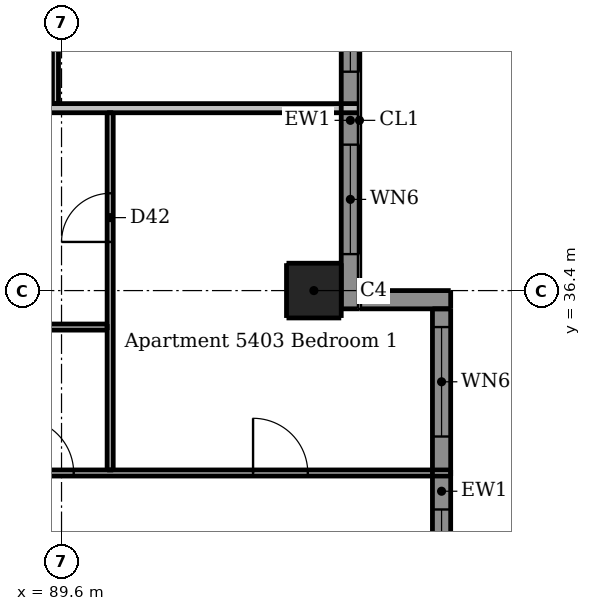
"""IFC4 building model, lengths in metres.
Left out: names, types, materials, properties, quantities, classifications, styles, units other than length and angle.
Written with IfcOpenShell. Run it as: python <this file> out.ifc"""

import sys

from ifc_helpers import new_model, si_unit, direction, frame, frame_2d, origin, origin_2d, place, context, subcontext, project, spatial, rectangle, extrude, element, fill, save


model = new_model("IFC4")
c1 = context("Model", 3, precision=1e-05, world=origin(), true_north=direction((0.0, 1.0)))
c2 = subcontext(c1, "Body", "Model", "MODEL_VIEW")
j1 = project(units=[si_unit("LENGTHUNIT", "METRE"), si_unit("PLANEANGLEUNIT", "RADIAN")], contexts=[c1])
p1 = place(None, origin())
s1 = spatial("IfcSite", under=j1, at=p1, CompositionType="ELEMENT")
p2 = place(p1, origin())
s2 = spatial("IfcBuilding", under=s1, at=p2, CompositionType="ELEMENT")
p3 = place(p2, frame((0.0, 0.0, 203.5)))
s3 = spatial("IfcBuildingStorey", under=s2, at=p3, CompositionType="ELEMENT", Elevation=203.5)
p4 = place(p3, frame((93.75, 36.4, 0.0), z_axis=(0.0, 0.0, 1.0), x_axis=(1.0, 0.0, 0.0)))
e1 = element("IfcColumn", 1, at=p4, inside=s3, PredefinedType="COLUMN", context=c2, shape_type="SweptSolid", body=[
    extrude(rectangle(XDim=0.9, YDim=0.9, at=origin_2d()), origin(), (0.0, 0.0, 1.0), 3.05),
])
p5 = place(p3, frame((96.0, 36.25, 0.0), z_axis=(0.0, 0.0, 1.0), x_axis=(-1.0, 0.0, 0.0)))
e2 = element("IfcWall", 2, at=p5, inside=s3, PredefinedType="SOLIDWALL", context=c2, shape_type="SweptSolid", body=[
    extrude(rectangle(XDim=1.5, YDim=0.3, at=frame_2d((0.75, 0.0))), origin(), (0.0, 0.0, 1.0), 3.05),
])
p6 = place(p3, frame((95.85, 30.1, 0.0), z_axis=(0.0, 0.0, 1.0), x_axis=(0.0, 1.0, 0.0)))
e3 = element("IfcWall", 3, at=p6, inside=s3, PredefinedType="SOLIDWALL", context=c2, shape_type="SweptSolid", body=[
    extrude(rectangle(XDim=6.0, YDim=0.3, at=frame_2d((3.0, 0.0))), origin(), (0.0, 0.0, 1.0), 3.05),
])
p7 = place(p6, frame((0.9, 0.0, 0.15)))
e4 = element("IfcOpeningElement", 4, at=p7, cuts=e3, PredefinedType="OPENING", context=c2, shape_type="SweptSolid", body=[
    extrude(rectangle(XDim=1.8, YDim=2.1, at=frame_2d((0.9, 1.05))), frame((0.0, 0.16, 0.0), z_axis=(0.0, -1.0, 0.0), x_axis=(1.0, 0.0, 0.0)), (0.0, 0.0, 1.0), 0.32),
])
p8 = place(p6, frame((3.9, 0.0, 0.15)))
e5 = element("IfcOpeningElement", 5, at=p8, cuts=e3, PredefinedType="OPENING", context=c2, shape_type="SweptSolid", body=[
    extrude(rectangle(XDim=1.8, YDim=2.1, at=frame_2d((0.9, 1.05))), frame((0.0, 0.16, 0.0), z_axis=(0.0, -1.0, 0.0), x_axis=(1.0, 0.0, 0.0)), (0.0, 0.0, 1.0), 0.32),
])
p9 = place(p3, frame((94.35, 36.1, 0.0), z_axis=(0.0, 0.0, 1.0), x_axis=(0.0, 1.0, 0.0)))
e6 = element("IfcWall", 6, at=p9, inside=s3, PredefinedType="SOLIDWALL", context=c2, shape_type="SweptSolid", body=[
    extrude(rectangle(XDim=6.2, YDim=0.3, at=frame_2d((3.1, 0.0))), origin(), (0.0, 0.0, 1.0), 3.05),
])
p10 = place(p9, frame((0.9, 0.0, 0.15)))
e7 = element("IfcOpeningElement", 7, at=p10, cuts=e6, PredefinedType="OPENING", context=c2, shape_type="SweptSolid", body=[
    extrude(rectangle(XDim=1.8, YDim=2.1, at=frame_2d((0.9, 1.05))), frame((0.0, 0.16, 0.0), z_axis=(0.0, -1.0, 0.0), x_axis=(1.0, 0.0, 0.0)), (0.0, 0.0, 1.0), 0.32),
])
p11 = place(p9, frame((3.9, 0.0, 0.15)))
e8 = element("IfcOpeningElement", 8, at=p11, cuts=e6, PredefinedType="OPENING", context=c2, shape_type="SweptSolid", body=[
    extrude(rectangle(XDim=1.8, YDim=2.1, at=frame_2d((0.9, 1.05))), frame((0.0, 0.16, 0.0), z_axis=(0.0, -1.0, 0.0), x_axis=(1.0, 0.0, 0.0)), (0.0, 0.0, 1.0), 0.32),
])
p12 = place(p3, frame((89.5, 60.325, 0.0), z_axis=(0.0, 0.0, 1.0), x_axis=(0.0, -1.0, 0.0)))
e9 = element("IfcWall", 9, at=p12, inside=s3, PredefinedType="PARTITIONING", context=c2, shape_type="SweptSolid", body=[
    extrude(rectangle(XDim=20.85, YDim=0.1, at=frame_2d((10.425, 0.0))), origin(), (0.0, 0.0, 1.0), 2.51),
])
p13 = place(p12, frame((10.575, 0.0, 0.0)))
e10 = element("IfcOpeningElement", 10, at=p13, cuts=e9, PredefinedType="OPENING", context=c2, shape_type="SweptSolid", body=[
    extrude(rectangle(XDim=0.9, YDim=2.1, at=frame_2d((0.45, 1.05))), frame((0.0, 0.06, 0.0), z_axis=(0.0, -1.0, 0.0), x_axis=(1.0, 0.0, 0.0)), (0.0, 0.0, 1.0), 0.12),
])
p14 = place(p12, frame((6.675, 0.0, 0.0)))
e11 = element("IfcOpeningElement", 11, at=p14, cuts=e9, PredefinedType="OPENING", context=c2, shape_type="SweptSolid", body=[
    extrude(rectangle(XDim=0.9, YDim=2.1, at=frame_2d((0.45, 1.05))), frame((0.0, 0.06, 0.0), z_axis=(0.0, -1.0, 0.0), x_axis=(1.0, 0.0, 0.0)), (0.0, 0.0, 1.0), 0.12),
])
p15 = place(p12, frame((8.775, 0.0, 0.0)))
e12 = element("IfcOpeningElement", 12, at=p15, cuts=e9, PredefinedType="OPENING", context=c2, shape_type="SweptSolid", body=[
    extrude(rectangle(XDim=0.9, YDim=2.1, at=frame_2d((0.45, 1.05))), frame((0.0, 0.06, 0.0), z_axis=(0.0, -1.0, 0.0), x_axis=(1.0, 0.0, 0.0)), (0.0, 0.0, 1.0), 0.12),
])
p16 = place(p12, frame((19.075, 0.0, 0.0)))
e13 = element("IfcOpeningElement", 13, at=p16, cuts=e9, PredefinedType="OPENING", context=c2, shape_type="SweptSolid", body=[
    extrude(rectangle(XDim=0.9, YDim=2.1, at=frame_2d((0.45, 1.05))), frame((0.0, 0.06, 0.0), z_axis=(0.0, -1.0, 0.0), x_axis=(1.0, 0.0, 0.0)), (0.0, 0.0, 1.0), 0.12),
])
p17 = place(p12, frame((15.775, 0.0, 0.0)))
e14 = element("IfcOpeningElement", 14, at=p17, cuts=e9, PredefinedType="OPENING", context=c2, shape_type="SweptSolid", body=[
    extrude(rectangle(XDim=0.9, YDim=2.1, at=frame_2d((0.45, 1.05))), frame((0.0, 0.06, 0.0), z_axis=(0.0, -1.0, 0.0), x_axis=(1.0, 0.0, 0.0)), (0.0, 0.0, 1.0), 0.12),
])
p18 = place(p12, frame((1.275, 0.0, 0.0)))
e15 = element("IfcOpeningElement", 15, at=p18, cuts=e9, PredefinedType="OPENING", context=c2, shape_type="SweptSolid", body=[
    extrude(rectangle(XDim=0.9, YDim=2.1, at=frame_2d((0.45, 1.05))), frame((0.0, 0.06, 0.0), z_axis=(0.0, -1.0, 0.0), x_axis=(1.0, 0.0, 0.0)), (0.0, 0.0, 1.0), 0.12),
])
p19 = place(p12, frame((12.725, 0.0, 0.0)))
e16 = element("IfcOpeningElement", 16, at=p19, cuts=e9, PredefinedType="OPENING", context=c2, shape_type="SweptSolid", body=[
    extrude(rectangle(XDim=0.8, YDim=2.1, at=frame_2d((0.4, 1.05))), frame((0.0, 0.06, 0.0), z_axis=(0.0, -1.0, 0.0), x_axis=(1.0, 0.0, 0.0)), (0.0, 0.0, 1.0), 0.12),
])
p20 = place(p12, frame((4.325, 0.0, 0.0)))
e17 = element("IfcOpeningElement", 17, at=p20, cuts=e9, PredefinedType="OPENING", context=c2, shape_type="SweptSolid", body=[
    extrude(rectangle(XDim=0.8, YDim=2.1, at=frame_2d((0.4, 1.05))), frame((0.0, 0.06, 0.0), z_axis=(0.0, -1.0, 0.0), x_axis=(1.0, 0.0, 0.0)), (0.0, 0.0, 1.0), 0.12),
])
p21 = place(p3, frame((90.4, 33.45, 0.0), z_axis=(0.0, 0.0, 1.0), x_axis=(0.0, 1.0, 0.0)))
e18 = element("IfcWall", 18, at=p21, inside=s3, PredefinedType="PARTITIONING", context=c2, shape_type="SweptSolid", body=[
    extrude(rectangle(XDim=5.875, YDim=0.1, at=frame_2d((2.938, 0.0))), origin(), (0.0, 0.0, 1.0), 3.05),
])
p22 = place(p21, frame((3.75, 0.0, 0.0)))
e19 = element("IfcOpeningElement", 19, at=p22, cuts=e18, PredefinedType="OPENING", context=c2, shape_type="SweptSolid", body=[
    extrude(rectangle(XDim=0.8, YDim=2.1, at=frame_2d((0.4, 1.05))), frame((0.0, 0.06, 0.0), z_axis=(0.0, -1.0, 0.0), x_axis=(1.0, 0.0, 0.0)), (0.0, 0.0, 1.0), 0.12),
])
p23 = place(p3, frame((88.375, 35.8, 0.0), z_axis=(0.0, 0.0, 1.0), x_axis=(1.0, 0.0, 0.0)))
e20 = element("IfcWall", 20, at=p23, inside=s3, PredefinedType="PARTITIONING", context=c2, shape_type="SweptSolid", body=[
    extrude(rectangle(XDim=1.975, YDim=0.1, at=frame_2d((0.988, 0.0))), origin(), (0.0, 0.0, 1.0), 3.05),
])
p24 = place(p3, frame((88.375, 33.4, 0.0), z_axis=(0.0, 0.0, 1.0), x_axis=(1.0, 0.0, 0.0)))
e21 = element("IfcWall", 21, at=p24, inside=s3, PredefinedType="PARTITIONING", context=c2, shape_type="SweptSolid", body=[
    extrude(rectangle(XDim=7.625, YDim=0.1, at=frame_2d((3.812, 0.0))), origin(), (0.0, 0.0, 1.0), 3.05),
])
p25 = place(p24, frame((0.525, 0.0, 0.0)))
e22 = element("IfcOpeningElement", 22, at=p25, cuts=e21, PredefinedType="OPENING", context=c2, shape_type="SweptSolid", body=[
    extrude(rectangle(XDim=0.9, YDim=2.1, at=frame_2d((0.45, 1.05))), frame((0.0, 0.06, 0.0), z_axis=(0.0, -1.0, 0.0), x_axis=(1.0, 0.0, 0.0)), (0.0, 0.0, 1.0), 0.12),
])
p26 = place(p24, frame((4.375, 0.0, 0.0)))
e23 = element("IfcOpeningElement", 23, at=p26, cuts=e21, PredefinedType="OPENING", context=c2, shape_type="SweptSolid", body=[
    extrude(rectangle(XDim=0.9, YDim=2.1, at=frame_2d((0.45, 1.05))), frame((0.0, 0.06, 0.0), z_axis=(0.0, -1.0, 0.0), x_axis=(1.0, 0.0, 0.0)), (0.0, 0.0, 1.0), 0.12),
])
p27 = place(p3, frame((88.375, 39.4, 0.0), z_axis=(0.0, 0.0, 1.0), x_axis=(1.0, 0.0, 0.0)))
e24 = element("IfcWall", 24, at=p27, inside=s3, PredefinedType="PARTITIONING", context=c2, shape_type="SweptSolid", body=[
    extrude(rectangle(XDim=6.125, YDim=0.15, at=frame_2d((3.062, 0.0))), origin(), (0.0, 0.0, 1.0), 3.05),
])
p28 = place(p7, origin())
e25 = element("IfcWindow", 25, at=p28, inside=s3, PartitioningType="DOUBLE_PANEL_VERTICAL", PredefinedType="WINDOW", context=c2, shape_type="SweptSolid", body=[
    extrude(rectangle(XDim=1.8, YDim=2.1, at=frame_2d((0.9, 1.05))), frame((0.0, 0.03, 0.0), z_axis=(0.0, -1.0, 0.0), x_axis=(1.0, 0.0, 0.0)), (0.0, 0.0, 1.0), 0.06),
])
fill(e4, e25)
p29 = place(p8, origin())
e26 = element("IfcWindow", 26, at=p29, inside=s3, PartitioningType="DOUBLE_PANEL_VERTICAL", PredefinedType="WINDOW", context=c2, shape_type="SweptSolid", body=[
    extrude(rectangle(XDim=1.8, YDim=2.1, at=frame_2d((0.9, 1.05))), frame((0.0, 0.03, 0.0), z_axis=(0.0, -1.0, 0.0), x_axis=(1.0, 0.0, 0.0)), (0.0, 0.0, 1.0), 0.06),
])
fill(e5, e26)
p30 = place(p10, origin())
e27 = element("IfcWindow", 27, at=p30, inside=s3, PartitioningType="DOUBLE_PANEL_VERTICAL", PredefinedType="WINDOW", context=c2, shape_type="SweptSolid", body=[
    extrude(rectangle(XDim=1.8, YDim=2.1, at=frame_2d((0.9, 1.05))), frame((0.0, 0.03, 0.0), z_axis=(0.0, -1.0, 0.0), x_axis=(1.0, 0.0, 0.0)), (0.0, 0.0, 1.0), 0.06),
])
fill(e7, e27)
p31 = place(p11, origin())
e28 = element("IfcWindow", 28, at=p31, inside=s3, PartitioningType="DOUBLE_PANEL_VERTICAL", PredefinedType="WINDOW", context=c2, shape_type="SweptSolid", body=[
    extrude(rectangle(XDim=1.8, YDim=2.1, at=frame_2d((0.9, 1.05))), frame((0.0, 0.03, 0.0), z_axis=(0.0, -1.0, 0.0), x_axis=(1.0, 0.0, 0.0)), (0.0, 0.0, 1.0), 0.06),
])
fill(e8, e28)
p32 = place(p25, origin())
e29 = element("IfcDoor", 29, at=p32, inside=s3, OperationType="SINGLE_SWING_LEFT", PredefinedType="DOOR", context=c2, shape_type="SweptSolid", body=[
    extrude(rectangle(XDim=0.9, YDim=2.1, at=frame_2d((0.45, 1.05))), frame((0.0, 0.025, 0.0), z_axis=(0.0, -1.0, 0.0), x_axis=(1.0, 0.0, 0.0)), (0.0, 0.0, 1.0), 0.05),
])
fill(e22, e29)
p33 = place(p26, origin())
e30 = element("IfcDoor", 30, at=p33, inside=s3, OperationType="SINGLE_SWING_LEFT", PredefinedType="DOOR", context=c2, shape_type="SweptSolid", body=[
    extrude(rectangle(XDim=0.9, YDim=2.1, at=frame_2d((0.45, 1.05))), frame((0.0, 0.025, 0.0), z_axis=(0.0, -1.0, 0.0), x_axis=(1.0, 0.0, 0.0)), (0.0, 0.0, 1.0), 0.05),
])
fill(e23, e30)
p34 = place(p22, origin())
e31 = element("IfcDoor", 31, at=p34, inside=s3, OperationType="SINGLE_SWING_LEFT", PredefinedType="DOOR", context=c2, shape_type="SweptSolid", body=[
    extrude(rectangle(XDim=0.8, YDim=2.1, at=frame_2d((0.4, 1.05))), frame((0.0, 0.025, 0.0), z_axis=(0.0, -1.0, 0.0), x_axis=(1.0, 0.0, 0.0)), (0.0, 0.0, 1.0), 0.05),
])
fill(e19, e31)
save(model, sys.argv[1])
